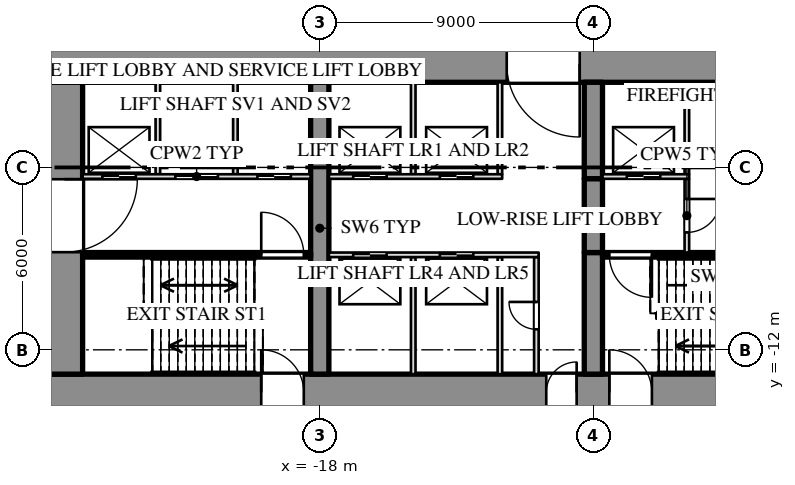
"""IFC4 building model, lengths in metres.
Left out: names, types, materials, properties, quantities, classifications, styles, units other than length and angle.
Written with IfcOpenShell. Run it as: python <this file> out.ifc"""

import sys

from ifc_helpers import new_model, si_unit, direction, frame, frame_2d, origin, place, context, subcontext, project, spatial, rectangle, extrude, element, fill, save


model = new_model("IFC4")
c1 = context("Model", 3, precision=1e-05, world=origin(), true_north=direction((0.0, 1.0)))
c2 = subcontext(c1, "Body", "Model", "MODEL_VIEW")
j1 = project(units=[si_unit("LENGTHUNIT", "METRE"), si_unit("PLANEANGLEUNIT", "RADIAN")], contexts=[c1])
p1 = place(None, origin())
s1 = spatial("IfcSite", under=j1, at=p1, CompositionType="ELEMENT")
p2 = place(p1, origin())
s2 = spatial("IfcBuilding", under=s1, at=p2, CompositionType="ELEMENT")
p3 = place(p2, origin())
s3 = spatial("IfcBuildingStorey", under=s2, at=p3, CompositionType="ELEMENT", Elevation=0.0)
p4 = place(p3, frame((-27.0, -2.6, 0.0), z_axis=(0.0, 0.0, 1.0), x_axis=(1.0, 0.0, 0.0)))
e1 = element("IfcWall", 1, at=p4, inside=s3, PredefinedType="SHEAR", context=c2, shape_type="SweptSolid", body=[
    extrude(rectangle(XDim=54.0, YDim=1.2, at=frame_2d((27.0, 0.0))), origin(), (0.0, 0.0, 1.0), 8.7),
])
p5 = place(p4, frame((15.15, 0.0, 0.0)))
e2 = element("IfcOpeningElement", 2, at=p5, cuts=e1, PredefinedType="OPENING", context=c2, shape_type="SweptSolid", body=[
    extrude(rectangle(XDim=2.4, YDim=2.1, at=frame_2d((1.2, 1.05))), frame((0.0, 0.612, 0.0), z_axis=(0.0, -1.0, 0.0), x_axis=(1.0, 0.0, 0.0)), (0.0, 0.0, 1.0), 1.224),
])
p6 = place(p4, frame((36.45, 0.0, 0.0)))
e3 = element("IfcOpeningElement", 3, at=p6, cuts=e1, PredefinedType="OPENING", context=c2, shape_type="SweptSolid", body=[
    extrude(rectangle(XDim=2.4, YDim=2.1, at=frame_2d((1.2, 1.05))), frame((0.0, 0.612, 0.0), z_axis=(0.0, -1.0, 0.0), x_axis=(1.0, 0.0, 0.0)), (0.0, 0.0, 1.0), 1.224),
])
p7 = place(p3, frame((-27.0, -13.4, 0.0), z_axis=(0.0, 0.0, 1.0), x_axis=(1.0, 0.0, 0.0)))
e4 = element("IfcWall", 4, at=p7, inside=s3, PredefinedType="SHEAR", context=c2, shape_type="SweptSolid", body=[
    extrude(rectangle(XDim=54.0, YDim=1.2, at=frame_2d((27.0, 0.0))), origin(), (0.0, 0.0, 1.0), 8.7),
])
p8 = place(p7, frame((7.075, 0.0, 0.0)))
e5 = element("IfcOpeningElement", 5, at=p8, cuts=e4, PredefinedType="OPENING", context=c2, shape_type="SweptSolid", body=[
    extrude(rectangle(XDim=1.4, YDim=2.1, at=frame_2d((0.7, 1.05))), frame((0.0, 0.612, 0.0), z_axis=(0.0, -1.0, 0.0), x_axis=(1.0, 0.0, 0.0)), (0.0, 0.0, 1.0), 1.224),
])
p9 = place(p7, frame((16.45, 0.0, 0.0)))
e6 = element("IfcOpeningElement", 6, at=p9, cuts=e4, PredefinedType="OPENING", context=c2, shape_type="SweptSolid", body=[
    extrude(rectangle(XDim=1.0, YDim=2.1, at=frame_2d((0.5, 1.05))), frame((0.0, 0.612, 0.0), z_axis=(0.0, -1.0, 0.0), x_axis=(1.0, 0.0, 0.0)), (0.0, 0.0, 1.0), 1.224),
])
p10 = place(p7, frame((18.525, 0.0, 0.0)))
e7 = element("IfcOpeningElement", 7, at=p10, cuts=e4, PredefinedType="OPENING", context=c2, shape_type="SweptSolid", body=[
    extrude(rectangle(XDim=1.4, YDim=2.1, at=frame_2d((0.7, 1.05))), frame((0.0, 0.612, 0.0), z_axis=(0.0, -1.0, 0.0), x_axis=(1.0, 0.0, 0.0)), (0.0, 0.0, 1.0), 1.224),
])
p11 = place(p7, frame((34.075, 0.0, 0.0)))
e8 = element("IfcOpeningElement", 8, at=p11, cuts=e4, PredefinedType="OPENING", context=c2, shape_type="SweptSolid", body=[
    extrude(rectangle(XDim=1.4, YDim=2.1, at=frame_2d((0.7, 1.05))), frame((0.0, 0.612, 0.0), z_axis=(0.0, -1.0, 0.0), x_axis=(1.0, 0.0, 0.0)), (0.0, 0.0, 1.0), 1.224),
])
p12 = place(p7, frame((36.55, 0.0, 0.0)))
e9 = element("IfcOpeningElement", 9, at=p12, cuts=e4, PredefinedType="OPENING", context=c2, shape_type="SweptSolid", body=[
    extrude(rectangle(XDim=1.0, YDim=2.1, at=frame_2d((0.5, 1.05))), frame((0.0, 0.612, 0.0), z_axis=(0.0, -1.0, 0.0), x_axis=(1.0, 0.0, 0.0)), (0.0, 0.0, 1.0), 1.224),
])
p13 = place(p7, frame((45.525, 0.0, 0.0)))
e10 = element("IfcOpeningElement", 10, at=p13, cuts=e4, PredefinedType="OPENING", context=c2, shape_type="SweptSolid", body=[
    extrude(rectangle(XDim=1.4, YDim=2.1, at=frame_2d((0.7, 1.05))), frame((0.0, 0.612, 0.0), z_axis=(0.0, -1.0, 0.0), x_axis=(1.0, 0.0, 0.0)), (0.0, 0.0, 1.0), 1.224),
])
p14 = place(p3, frame((-26.4, -12.8, 0.0), z_axis=(0.0, 0.0, 1.0), x_axis=(0.0, 1.0, 0.0)))
e11 = element("IfcWall", 11, at=p14, inside=s3, PredefinedType="SHEAR", context=c2, shape_type="SweptSolid", body=[
    extrude(rectangle(XDim=9.6, YDim=1.2, at=frame_2d((4.8, 0.0))), origin(), (0.0, 0.0, 1.0), 8.7),
])
p15 = place(p14, frame((4.012, 0.0, 0.0)))
e12 = element("IfcOpeningElement", 12, at=p15, cuts=e11, PredefinedType="OPENING", context=c2, shape_type="SweptSolid", body=[
    extrude(rectangle(XDim=2.4, YDim=2.1, at=frame_2d((1.2, 1.05))), frame((0.0, 0.612, 0.0), z_axis=(0.0, -1.0, 0.0), x_axis=(1.0, 0.0, 0.0)), (0.0, 0.0, 1.0), 1.224),
])
p16 = place(p3, frame((-18.0, -12.8, 0.0), z_axis=(0.0, 0.0, 1.0), x_axis=(0.0, 1.0, 0.0)))
e13 = element("IfcWall", 13, at=p16, inside=s3, PredefinedType="SHEAR", context=c2, shape_type="SweptSolid", body=[
    extrude(rectangle(XDim=9.6, YDim=0.6, at=frame_2d((4.8, 0.0))), origin(), (0.0, 0.0, 1.0), 8.7),
])
p17 = place(p3, frame((-9.0, -12.8, 0.0), z_axis=(0.0, 0.0, 1.0), x_axis=(0.0, 1.0, 0.0)))
e14 = element("IfcWall", 14, at=p17, inside=s3, PredefinedType="SHEAR", context=c2, shape_type="SweptSolid", body=[
    extrude(rectangle(XDim=4.0, YDim=0.6, at=frame_2d((2.0, 0.0))), origin(), (0.0, 0.0, 1.0), 8.7),
])
p18 = place(p3, frame((-9.0, -6.375, 0.0), z_axis=(0.0, 0.0, 1.0), x_axis=(0.0, 1.0, 0.0)))
e15 = element("IfcWall", 15, at=p18, inside=s3, PredefinedType="SHEAR", context=c2, shape_type="SweptSolid", body=[
    extrude(rectangle(XDim=3.175, YDim=0.6, at=frame_2d((1.587, 0.0))), origin(), (0.0, 0.0, 1.0), 8.7),
])
p19 = place(p3, frame((-9.0, -8.8, 3.6), z_axis=(0.0, 0.0, 1.0), x_axis=(0.0, 1.0, 0.0)))
e16 = element("IfcWall", 16, at=p19, inside=s3, PredefinedType="SHEAR", context=c2, shape_type="SweptSolid", body=[
    extrude(rectangle(XDim=2.425, YDim=0.6, at=frame_2d((1.212, 0.0))), origin(), (0.0, 0.0, 1.0), 5.1),
])
for number, where, z_axis, x_axis in (
    (17, (-20.775, -6.225, 0.0), (0.0, 0.0, 1.0), (0.0, 1.0, 0.0)),
    (18, (-23.325, -6.225, 0.0), (0.0, 0.0, 1.0), (0.0, 1.0, 0.0)),
    (19, (-12.075, -6.225, 0.0), (0.0, 0.0, 1.0), (0.0, 1.0, 0.0)),
    (20, (-14.925, -6.225, 0.0), (0.0, 0.0, 1.0), (0.0, 1.0, 0.0)),
    (21, (-5.925, -6.225, 0.0), (0.0, 0.0, 1.0), (0.0, 1.0, 0.0)),
):
    element("IfcWall", number, at=place(p3, frame(where, z_axis=z_axis, x_axis=x_axis)), inside=s3, PredefinedType="PARTITIONING", context=c2, shape_type="SweptSolid", body=[
        extrude(rectangle(XDim=3.025, YDim=0.15, at=frame_2d((1.513, 0.0))), origin(), (0.0, 0.0, 1.0), 8.7),
    ])
p20 = place(p3, frame((-10.875, -12.8, 0.0), z_axis=(0.0, 0.0, 1.0), x_axis=(0.0, 1.0, 0.0)))
e22 = element("IfcWall", 22, at=p20, inside=s3, PredefinedType="PARTITIONING", context=c2, shape_type="SweptSolid", body=[
    extrude(rectangle(XDim=3.85, YDim=0.15, at=frame_2d((1.925, 0.0))), origin(), (0.0, 0.0, 1.0), 8.7),
])
p21 = place(p20, frame((1.475, 0.0, 0.0)))
e23 = element("IfcOpeningElement", 23, at=p21, cuts=e22, PredefinedType="OPENING", context=c2, shape_type="SweptSolid", body=[
    extrude(rectangle(XDim=0.9, YDim=2.1, at=frame_2d((0.45, 1.05))), frame((0.0, 0.087, 0.0), z_axis=(0.0, -1.0, 0.0), x_axis=(1.0, 0.0, 0.0)), (0.0, 0.0, 1.0), 0.174),
])
for number, where, z_axis, x_axis in (
    (24, (-12.075, -12.8, 0.0), (0.0, 0.0, 1.0), (0.0, 1.0, 0.0)),
    (25, (-14.925, -12.8, 0.0), (0.0, 0.0, 1.0), (0.0, 1.0, 0.0)),
):
    element("IfcWall", number, at=place(p3, frame(where, z_axis=z_axis, x_axis=x_axis)), inside=s3, PredefinedType="PARTITIONING", context=c2, shape_type="SweptSolid", body=[
        extrude(rectangle(XDim=3.85, YDim=0.15, at=frame_2d((1.925, 0.0))), origin(), (0.0, 0.0, 1.0), 8.7),
    ])
p22 = place(p3, frame((-5.925, -8.8, 0.0), z_axis=(0.0, 0.0, 1.0), x_axis=(0.0, 1.0, 0.0)))
e26 = element("IfcWall", 26, at=p22, inside=s3, PredefinedType="PARTITIONING", context=c2, shape_type="SweptSolid", body=[
    extrude(rectangle(XDim=2.425, YDim=0.15, at=frame_2d((1.212, 0.0))), origin(), (0.0, 0.0, 1.0), 8.7),
])
p23 = place(p22, frame((0.662, 0.0, 0.0)))
e27 = element("IfcOpeningElement", 27, at=p23, cuts=e26, PredefinedType="OPENING", context=c2, shape_type="SweptSolid", body=[
    extrude(rectangle(XDim=1.1, YDim=2.1, at=frame_2d((0.55, 1.05))), frame((0.0, 0.087, 0.0), z_axis=(0.0, -1.0, 0.0), x_axis=(1.0, 0.0, 0.0)), (0.0, 0.0, 1.0), 0.174),
])
p24 = place(p3, frame((-25.8, -6.3, 0.0), z_axis=(0.0, 0.0, 1.0), x_axis=(1.0, 0.0, 0.0)))
e28 = element("IfcWall", 28, at=p24, inside=s3, PredefinedType="PARTITIONING", context=c2, shape_type="SweptSolid", body=[
    extrude(rectangle(XDim=7.5, YDim=0.15, at=frame_2d((3.75, 0.0))), origin(), (0.0, 0.0, 1.0), 8.7),
])
p25 = place(p24, frame((0.65, 0.0, 0.0)))
e29 = element("IfcOpeningElement", 29, at=p25, cuts=e28, PredefinedType="OPENING", context=c2, shape_type="SweptSolid", body=[
    extrude(rectangle(XDim=1.1, YDim=2.1, at=frame_2d((0.55, 1.05))), frame((0.0, 0.087, 0.0), z_axis=(0.0, -1.0, 0.0), x_axis=(1.0, 0.0, 0.0)), (0.0, 0.0, 1.0), 0.174),
])
p26 = place(p24, frame((3.05, 0.0, 0.0)))
e30 = element("IfcOpeningElement", 30, at=p26, cuts=e28, PredefinedType="OPENING", context=c2, shape_type="SweptSolid", body=[
    extrude(rectangle(XDim=1.4, YDim=2.1, at=frame_2d((0.7, 1.05))), frame((0.0, 0.087, 0.0), z_axis=(0.0, -1.0, 0.0), x_axis=(1.0, 0.0, 0.0)), (0.0, 0.0, 1.0), 0.174),
])
p27 = place(p24, frame((5.75, 0.0, 0.0)))
e31 = element("IfcOpeningElement", 31, at=p27, cuts=e28, PredefinedType="OPENING", context=c2, shape_type="SweptSolid", body=[
    extrude(rectangle(XDim=1.1, YDim=2.1, at=frame_2d((0.55, 1.05))), frame((0.0, 0.087, 0.0), z_axis=(0.0, -1.0, 0.0), x_axis=(1.0, 0.0, 0.0)), (0.0, 0.0, 1.0), 0.174),
])
p28 = place(p3, frame((-17.7, -6.3, 0.0), z_axis=(0.0, 0.0, 1.0), x_axis=(1.0, 0.0, 0.0)))
e32 = element("IfcWall", 32, at=p28, inside=s3, PredefinedType="PARTITIONING", context=c2, shape_type="SweptSolid", body=[
    extrude(rectangle(XDim=5.7, YDim=0.15, at=frame_2d((2.85, 0.0))), origin(), (0.0, 0.0, 1.0), 8.7),
])
p29 = place(p28, frame((0.8, 0.0, 0.0)))
e33 = element("IfcOpeningElement", 33, at=p29, cuts=e32, PredefinedType="OPENING", context=c2, shape_type="SweptSolid", body=[
    extrude(rectangle(XDim=1.1, YDim=2.1, at=frame_2d((0.55, 1.05))), frame((0.0, 0.087, 0.0), z_axis=(0.0, -1.0, 0.0), x_axis=(1.0, 0.0, 0.0)), (0.0, 0.0, 1.0), 0.174),
])
p30 = place(p28, frame((3.65, 0.0, 0.0)))
e34 = element("IfcOpeningElement", 34, at=p30, cuts=e32, PredefinedType="OPENING", context=c2, shape_type="SweptSolid", body=[
    extrude(rectangle(XDim=1.1, YDim=2.1, at=frame_2d((0.55, 1.05))), frame((0.0, 0.087, 0.0), z_axis=(0.0, -1.0, 0.0), x_axis=(1.0, 0.0, 0.0)), (0.0, 0.0, 1.0), 0.174),
])
p31 = place(p3, frame((-8.7, -6.3, 0.0), z_axis=(0.0, 0.0, 1.0), x_axis=(1.0, 0.0, 0.0)))
e35 = element("IfcWall", 35, at=p31, inside=s3, PredefinedType="PARTITIONING", context=c2, shape_type="SweptSolid", body=[
    extrude(rectangle(XDim=2.85, YDim=0.15, at=frame_2d((1.425, 0.0))), origin(), (0.0, 0.0, 1.0), 8.7),
])
p32 = place(p31, frame((0.8, 0.0, 0.0)))
e36 = element("IfcOpeningElement", 36, at=p32, cuts=e35, PredefinedType="OPENING", context=c2, shape_type="SweptSolid", body=[
    extrude(rectangle(XDim=1.1, YDim=2.1, at=frame_2d((0.55, 1.05))), frame((0.0, 0.087, 0.0), z_axis=(0.0, -1.0, 0.0), x_axis=(1.0, 0.0, 0.0)), (0.0, 0.0, 1.0), 0.174),
])
p33 = place(p3, frame((-25.8, -8.875, 0.0), z_axis=(0.0, 0.0, 1.0), x_axis=(1.0, 0.0, 0.0)))
e37 = element("IfcWall", 37, at=p33, inside=s3, PredefinedType="SHEAR", context=c2, shape_type="SweptSolid", body=[
    extrude(rectangle(XDim=7.5, YDim=0.15, at=frame_2d((3.75, 0.0))), origin(), (0.0, 0.0, 1.0), 8.7),
])
p34 = place(p33, frame((5.875, 0.0, 0.0)))
e38 = element("IfcOpeningElement", 38, at=p34, cuts=e37, PredefinedType="OPENING", context=c2, shape_type="SweptSolid", body=[
    extrude(rectangle(XDim=1.4, YDim=2.1, at=frame_2d((0.7, 1.05))), frame((0.0, 0.087, 0.0), z_axis=(0.0, -1.0, 0.0), x_axis=(1.0, 0.0, 0.0)), (0.0, 0.0, 1.0), 0.174),
])
p35 = place(p3, frame((-17.7, -8.875, 0.0), z_axis=(0.0, 0.0, 1.0), x_axis=(1.0, 0.0, 0.0)))
e39 = element("IfcWall", 39, at=p35, inside=s3, PredefinedType="PARTITIONING", context=c2, shape_type="SweptSolid", body=[
    extrude(rectangle(XDim=6.9, YDim=0.15, at=frame_2d((3.45, 0.0))), origin(), (0.0, 0.0, 1.0), 8.7),
])
p36 = place(p35, frame((0.8, 0.0, 0.0)))
e40 = element("IfcOpeningElement", 40, at=p36, cuts=e39, PredefinedType="OPENING", context=c2, shape_type="SweptSolid", body=[
    extrude(rectangle(XDim=1.1, YDim=2.1, at=frame_2d((0.55, 1.05))), frame((0.0, 0.087, 0.0), z_axis=(0.0, -1.0, 0.0), x_axis=(1.0, 0.0, 0.0)), (0.0, 0.0, 1.0), 0.174),
])
p37 = place(p35, frame((3.65, 0.0, 0.0)))
e41 = element("IfcOpeningElement", 41, at=p37, cuts=e39, PredefinedType="OPENING", context=c2, shape_type="SweptSolid", body=[
    extrude(rectangle(XDim=1.1, YDim=2.1, at=frame_2d((0.55, 1.05))), frame((0.0, 0.087, 0.0), z_axis=(0.0, -1.0, 0.0), x_axis=(1.0, 0.0, 0.0)), (0.0, 0.0, 1.0), 0.174),
])
p38 = place(p3, frame((-8.7, -8.875, 0.0), z_axis=(0.0, 0.0, 1.0), x_axis=(1.0, 0.0, 0.0)))
e42 = element("IfcWall", 42, at=p38, inside=s3, PredefinedType="SHEAR", context=c2, shape_type="SweptSolid", body=[
    extrude(rectangle(XDim=8.4, YDim=0.15, at=frame_2d((4.2, 0.0))), origin(), (0.0, 0.0, 1.0), 8.7),
])
p39 = place(p38, frame((0.225, 0.0, 0.0)))
e43 = element("IfcOpeningElement", 43, at=p39, cuts=e42, PredefinedType="OPENING", context=c2, shape_type="SweptSolid", body=[
    extrude(rectangle(XDim=1.4, YDim=2.1, at=frame_2d((0.7, 1.05))), frame((0.0, 0.087, 0.0), z_axis=(0.0, -1.0, 0.0), x_axis=(1.0, 0.0, 0.0)), (0.0, 0.0, 1.0), 0.174),
])
p40 = place(p15, origin())
e44 = element("IfcDoor", 44, at=p40, inside=s3, OperationType="DOUBLE_DOOR_SINGLE_SWING", PredefinedType="DOOR", context=c2, shape_type="SweptSolid", body=[
    extrude(rectangle(XDim=2.4, YDim=2.1, at=frame_2d((1.2, 1.05))), frame((0.0, 0.025, 0.0), z_axis=(0.0, -1.0, 0.0), x_axis=(1.0, 0.0, 0.0)), (0.0, 0.0, 1.0), 0.05),
])
fill(e12, e44)
p41 = place(p25, origin())
e45 = element("IfcDoor", 45, at=p41, inside=s3, OperationType="SLIDING_TO_RIGHT", PredefinedType="DOOR", context=c2, shape_type="SweptSolid", body=[
    extrude(rectangle(XDim=1.1, YDim=2.1, at=frame_2d((0.55, 1.05))), frame((0.0, 0.025, 0.0), z_axis=(0.0, -1.0, 0.0), x_axis=(1.0, 0.0, 0.0)), (0.0, 0.0, 1.0), 0.05),
])
fill(e29, e45)
p42 = place(p26, origin())
e46 = element("IfcDoor", 46, at=p42, inside=s3, OperationType="SLIDING_TO_LEFT", PredefinedType="DOOR", context=c2, shape_type="SweptSolid", body=[
    extrude(rectangle(XDim=1.4, YDim=2.1, at=frame_2d((0.7, 1.05))), frame((0.0, 0.025, 0.0), z_axis=(0.0, -1.0, 0.0), x_axis=(1.0, 0.0, 0.0)), (0.0, 0.0, 1.0), 0.05),
])
fill(e30, e46)
p43 = place(p27, origin())
e47 = element("IfcDoor", 47, at=p43, inside=s3, OperationType="SLIDING_TO_RIGHT", PredefinedType="DOOR", context=c2, shape_type="SweptSolid", body=[
    extrude(rectangle(XDim=1.1, YDim=2.1, at=frame_2d((0.55, 1.05))), frame((0.0, 0.025, 0.0), z_axis=(0.0, -1.0, 0.0), x_axis=(1.0, 0.0, 0.0)), (0.0, 0.0, 1.0), 0.05),
])
fill(e31, e47)
p44 = place(p8, origin())
e48 = element("IfcDoor", 48, at=p44, inside=s3, OperationType="DOUBLE_DOOR_SINGLE_SWING", PredefinedType="DOOR", context=c2, shape_type="SweptSolid", body=[
    extrude(rectangle(XDim=1.4, YDim=2.1, at=frame_2d((0.7, 1.05))), frame((0.0, 0.025, 0.0), z_axis=(0.0, -1.0, 0.0), x_axis=(1.0, 0.0, 0.0)), (0.0, 0.0, 1.0), 0.05),
])
fill(e5, e48)
p45 = place(p34, origin())
e49 = element("IfcDoor", 49, at=p45, inside=s3, OperationType="DOUBLE_DOOR_SINGLE_SWING", PredefinedType="DOOR", context=c2, shape_type="SweptSolid", body=[
    extrude(rectangle(XDim=1.4, YDim=2.1, at=frame_2d((0.7, 1.05))), frame((0.0, 0.025, 0.0), z_axis=(0.0, -1.0, 0.0), x_axis=(1.0, 0.0, 0.0)), (0.0, 0.0, 1.0), 0.05),
])
fill(e38, e49)
p46 = place(p36, origin())
e50 = element("IfcDoor", 50, at=p46, inside=s3, OperationType="SLIDING_TO_LEFT", PredefinedType="DOOR", context=c2, shape_type="SweptSolid", body=[
    extrude(rectangle(XDim=1.1, YDim=2.1, at=frame_2d((0.55, 1.05))), frame((0.0, 0.025, 0.0), z_axis=(0.0, -1.0, 0.0), x_axis=(1.0, 0.0, 0.0)), (0.0, 0.0, 1.0), 0.05),
])
fill(e40, e50)
p47 = place(p29, origin())
e51 = element("IfcDoor", 51, at=p47, inside=s3, OperationType="SLIDING_TO_RIGHT", PredefinedType="DOOR", context=c2, shape_type="SweptSolid", body=[
    extrude(rectangle(XDim=1.1, YDim=2.1, at=frame_2d((0.55, 1.05))), frame((0.0, 0.025, 0.0), z_axis=(0.0, -1.0, 0.0), x_axis=(1.0, 0.0, 0.0)), (0.0, 0.0, 1.0), 0.05),
])
fill(e33, e51)
p48 = place(p37, origin())
e52 = element("IfcDoor", 52, at=p48, inside=s3, OperationType="SLIDING_TO_LEFT", PredefinedType="DOOR", context=c2, shape_type="SweptSolid", body=[
    extrude(rectangle(XDim=1.1, YDim=2.1, at=frame_2d((0.55, 1.05))), frame((0.0, 0.025, 0.0), z_axis=(0.0, -1.0, 0.0), x_axis=(1.0, 0.0, 0.0)), (0.0, 0.0, 1.0), 0.05),
])
fill(e41, e52)
p49 = place(p30, origin())
e53 = element("IfcDoor", 53, at=p49, inside=s3, OperationType="SLIDING_TO_RIGHT", PredefinedType="DOOR", context=c2, shape_type="SweptSolid", body=[
    extrude(rectangle(XDim=1.1, YDim=2.1, at=frame_2d((0.55, 1.05))), frame((0.0, 0.025, 0.0), z_axis=(0.0, -1.0, 0.0), x_axis=(1.0, 0.0, 0.0)), (0.0, 0.0, 1.0), 0.05),
])
fill(e34, e53)
p50 = place(p21, origin())
e54 = element("IfcDoor", 54, at=p50, inside=s3, OperationType="SINGLE_SWING_RIGHT", PredefinedType="DOOR", context=c2, shape_type="SweptSolid", body=[
    extrude(rectangle(XDim=0.9, YDim=2.1, at=frame_2d((0.45, 1.05))), frame((0.0, 0.025, 0.0), z_axis=(0.0, -1.0, 0.0), x_axis=(1.0, 0.0, 0.0)), (0.0, 0.0, 1.0), 0.05),
])
fill(e23, e54)
p51 = place(p5, origin())
e55 = element("IfcDoor", 55, at=p51, inside=s3, OperationType="DOUBLE_DOOR_SINGLE_SWING", PredefinedType="DOOR", context=c2, shape_type="SweptSolid", body=[
    extrude(rectangle(XDim=2.4, YDim=2.1, at=frame_2d((1.2, 1.05))), frame((0.0, 0.025, 0.0), z_axis=(0.0, -1.0, 0.0), x_axis=(1.0, 0.0, 0.0)), (0.0, 0.0, 1.0), 0.05),
])
fill(e2, e55)
p52 = place(p9, origin())
e56 = element("IfcDoor", 56, at=p52, inside=s3, OperationType="SINGLE_SWING_RIGHT", PredefinedType="DOOR", context=c2, shape_type="SweptSolid", body=[
    extrude(rectangle(XDim=1.0, YDim=2.1, at=frame_2d((0.5, 1.05))), frame((0.0, 0.025, 0.0), z_axis=(0.0, -1.0, 0.0), x_axis=(1.0, 0.0, 0.0)), (0.0, 0.0, 1.0), 0.05),
])
fill(e6, e56)
p53 = place(p10, origin())
e57 = element("IfcDoor", 57, at=p53, inside=s3, OperationType="DOUBLE_DOOR_SINGLE_SWING", PredefinedType="DOOR", context=c2, shape_type="SweptSolid", body=[
    extrude(rectangle(XDim=1.4, YDim=2.1, at=frame_2d((0.7, 1.05))), frame((0.0, 0.025, 0.0), z_axis=(0.0, -1.0, 0.0), x_axis=(1.0, 0.0, 0.0)), (0.0, 0.0, 1.0), 0.05),
])
fill(e7, e57)
p54 = place(p39, origin())
e58 = element("IfcDoor", 58, at=p54, inside=s3, OperationType="DOUBLE_DOOR_SINGLE_SWING", PredefinedType="DOOR", context=c2, shape_type="SweptSolid", body=[
    extrude(rectangle(XDim=1.4, YDim=2.1, at=frame_2d((0.7, 1.05))), frame((0.0, 0.025, 0.0), z_axis=(0.0, -1.0, 0.0), x_axis=(1.0, 0.0, 0.0)), (0.0, 0.0, 1.0), 0.05),
])
fill(e43, e58)
p55 = place(p32, origin())
e59 = element("IfcDoor", 59, at=p55, inside=s3, OperationType="SLIDING_TO_RIGHT", PredefinedType="DOOR", context=c2, shape_type="SweptSolid", body=[
    extrude(rectangle(XDim=1.1, YDim=2.1, at=frame_2d((0.55, 1.05))), frame((0.0, 0.025, 0.0), z_axis=(0.0, -1.0, 0.0), x_axis=(1.0, 0.0, 0.0)), (0.0, 0.0, 1.0), 0.05),
])
fill(e36, e59)
p56 = place(p23, origin())
e60 = element("IfcDoor", 60, at=p56, inside=s3, OperationType="SINGLE_SWING_LEFT", PredefinedType="DOOR", context=c2, shape_type="SweptSolid", body=[
    extrude(rectangle(XDim=1.1, YDim=2.1, at=frame_2d((0.55, 1.05))), frame((0.0, 0.025, 0.0), z_axis=(0.0, -1.0, 0.0), x_axis=(1.0, 0.0, 0.0)), (0.0, 0.0, 1.0), 0.05),
])
fill(e27, e60)
save(model, sys.argv[1])
